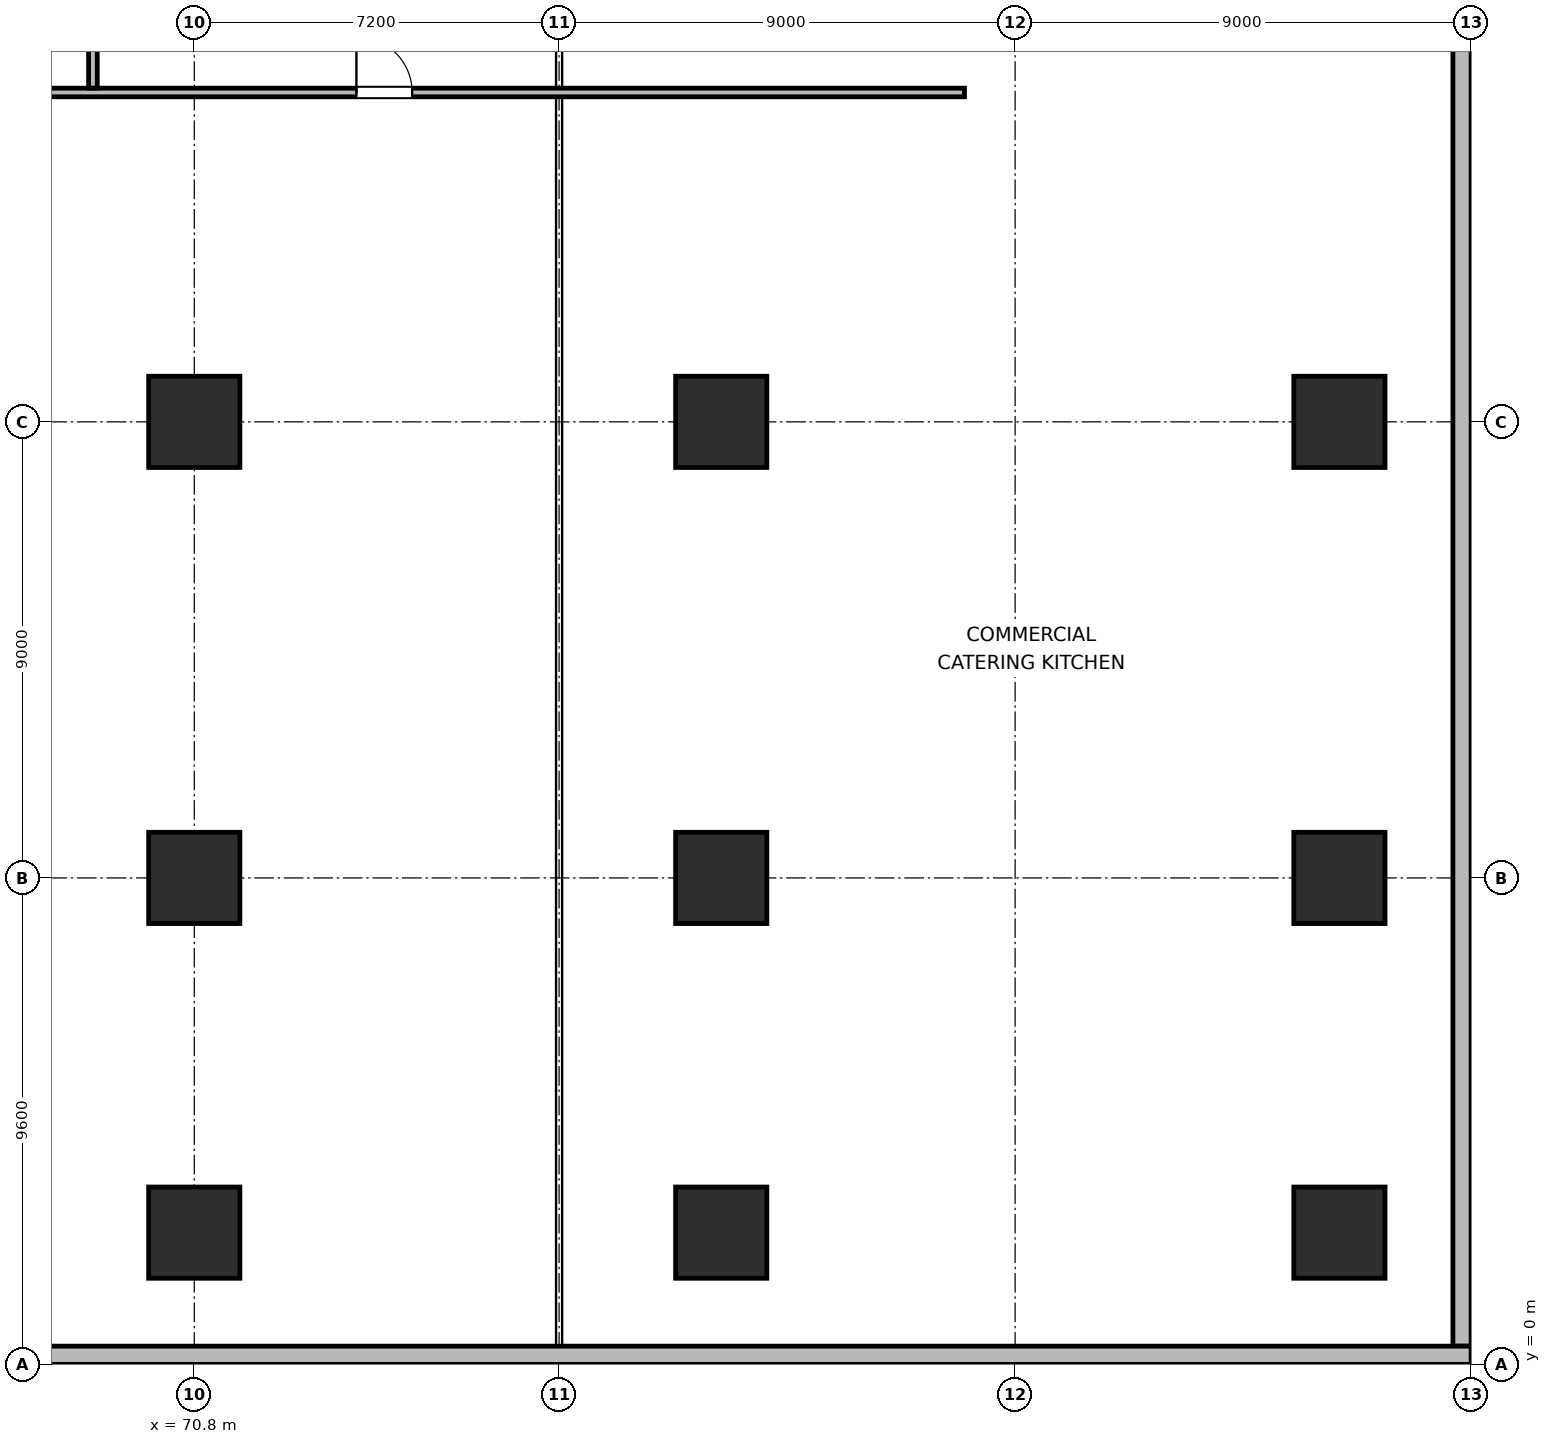
"""IFC4 building model, lengths in metres.
Left out: names, types, materials, properties, quantities, classifications, styles, units other than length and angle.
Written with IfcOpenShell. Run it as: python <this file> out.ifc"""

import sys

from ifc_helpers import new_model, si_unit, direction, frame, frame_2d, origin, origin_2d, place, context, subcontext, project, spatial, rectangle, extrude, element, fill, save


model = new_model("IFC4")
c1 = context("Model", 3, precision=1e-05, world=origin(), true_north=direction((0.0, 1.0)))
c2 = subcontext(c1, "Body", "Model", "MODEL_VIEW")
j1 = project(units=[si_unit("LENGTHUNIT", "METRE"), si_unit("PLANEANGLEUNIT", "RADIAN")], contexts=[c1])
p1 = place(None, origin())
s1 = spatial("IfcSite", under=j1, at=p1, CompositionType="ELEMENT")
p2 = place(p1, origin())
s2 = spatial("IfcBuilding", under=s1, at=p2, CompositionType="ELEMENT")
p3 = place(p2, frame((0.0, 0.0, 8.7)))
s3 = spatial("IfcBuildingStorey", under=s2, at=p3, CompositionType="ELEMENT", Elevation=8.7)
for number, where, z_axis, x_axis in (
    (1, (70.8, 2.6, 0.0), (0.0, 0.0, 1.0), (1.0, 0.0, 0.0)),
    (2, (70.8, 9.6, 0.0), (0.0, 0.0, 1.0), (1.0, 0.0, 0.0)),
    (3, (70.8, 18.6, 0.0), (0.0, 0.0, 1.0), (1.0, 0.0, 0.0)),
    (4, (81.2, 2.6, 0.0), (0.0, 0.0, 1.0), (1.0, 0.0, 0.0)),
    (5, (81.2, 9.6, 0.0), (0.0, 0.0, 1.0), (1.0, 0.0, 0.0)),
    (6, (81.2, 18.6, 0.0), (0.0, 0.0, 1.0), (1.0, 0.0, 0.0)),
    (7, (93.4, 2.6, 0.0), (0.0, 0.0, 1.0), (1.0, 0.0, 0.0)),
    (8, (93.4, 9.6, 0.0), (0.0, 0.0, 1.0), (1.0, 0.0, 0.0)),
    (9, (93.4, 18.6, 0.0), (0.0, 0.0, 1.0), (1.0, 0.0, 0.0)),
):
    element("IfcColumn", number, at=place(p3, frame(where, z_axis=z_axis, x_axis=x_axis)), inside=s3, PredefinedType="COLUMN", context=c2, shape_type="SweptSolid", body=[
        extrude(rectangle(XDim=1.8, YDim=1.8, at=origin_2d()), origin(), (0.0, 0.0, 1.0), 4.2),
    ])
p4 = place(p3, frame((95.82, 71.64, 0.0), z_axis=(0.0, 0.0, 1.0), x_axis=(0.0, -1.0, 0.0)))
e10 = element("IfcWall", 10, at=p4, inside=s3, PredefinedType="SOLIDWALL", context=c2, shape_type="SweptSolid", body=[
    extrude(rectangle(XDim=71.28, YDim=0.36, at=frame_2d((35.64, 0.0))), origin(), (0.0, 0.0, 1.0), 3.88),
])
p5 = place(p3, frame((96.0, 0.18, 0.0), z_axis=(0.0, 0.0, 1.0), x_axis=(-1.0, 0.0, 0.0)))
e11 = element("IfcWall", 11, at=p5, inside=s3, PredefinedType="SOLIDWALL", context=c2, shape_type="SweptSolid", body=[
    extrude(rectangle(XDim=39.72, YDim=0.36, at=frame_2d((19.86, 0.0))), origin(), (0.0, 0.0, 1.0), 3.88),
])
p6 = place(p3, frame((10.0, 25.1, 0.0), z_axis=(0.0, 0.0, 1.0), x_axis=(1.0, 0.0, 0.0)))
e12 = element("IfcWall", 12, at=p6, inside=s3, PredefinedType="PARTITIONING", context=c2, shape_type="SweptSolid", body=[
    extrude(rectangle(XDim=76.0, YDim=0.17, at=frame_2d((38.0, 0.0))), origin(), (0.0, 0.0, 1.0), 3.88),
])
p7 = place(p6, frame((2.2, 0.0, 0.0)))
e13 = element("IfcOpeningElement", 13, at=p7, cuts=e12, PredefinedType="OPENING", context=c2, shape_type="SweptSolid", body=[
    extrude(rectangle(XDim=1.8, YDim=2.06, at=frame_2d((0.9, 1.03))), frame((0.0, 0.095, 0.0), z_axis=(0.0, -1.0, 0.0), x_axis=(1.0, 0.0, 0.0)), (0.0, 0.0, 1.0), 0.19),
])
p8 = place(p6, frame((34.0, 0.0, 0.0)))
e14 = element("IfcOpeningElement", 14, at=p8, cuts=e12, PredefinedType="OPENING", context=c2, shape_type="SweptSolid", body=[
    extrude(rectangle(XDim=1.8, YDim=2.06, at=frame_2d((0.9, 1.03))), frame((0.0, 0.095, 0.0), z_axis=(0.0, -1.0, 0.0), x_axis=(1.0, 0.0, 0.0)), (0.0, 0.0, 1.0), 0.19),
])
p9 = place(p6, frame((64.0, 0.0, 0.0)))
e15 = element("IfcOpeningElement", 15, at=p9, cuts=e12, PredefinedType="OPENING", context=c2, shape_type="SweptSolid", body=[
    extrude(rectangle(XDim=1.1, YDim=2.05, at=frame_2d((0.55, 1.025))), frame((0.0, 0.095, 0.0), z_axis=(0.0, -1.0, 0.0), x_axis=(1.0, 0.0, 0.0)), (0.0, 0.0, 1.0), 0.19),
])
p10 = place(p3, frame((68.8, 25.187, 0.0), z_axis=(0.0, 0.0, 1.0), x_axis=(0.0, 1.0, 0.0)))
e16 = element("IfcWall", 16, at=p10, inside=s3, PredefinedType="PARTITIONING", context=c2, shape_type="SweptSolid", body=[
    extrude(rectangle(XDim=46.448, YDim=0.17, at=frame_2d((23.224, 0.0))), origin(), (0.0, 0.0, 1.0), 3.88),
])
p11 = place(p10, frame((15.913, 0.0, 0.0)))
e17 = element("IfcOpeningElement", 17, at=p11, cuts=e16, PredefinedType="OPENING", context=c2, shape_type="SweptSolid", body=[
    extrude(rectangle(XDim=1.1, YDim=2.05, at=frame_2d((0.55, 1.025))), frame((0.0, 0.095, 0.0), z_axis=(0.0, -1.0, 0.0), x_axis=(1.0, 0.0, 0.0)), (0.0, 0.0, 1.0), 0.19),
])
p12 = place(p9, origin())
e18 = element("IfcDoor", 18, at=p12, inside=s3, OperationType="SINGLE_SWING_LEFT", PredefinedType="DOOR", context=c2, shape_type="SweptSolid", body=[
    extrude(rectangle(XDim=1.1, YDim=2.05, at=frame_2d((0.55, 1.025))), frame((0.0, 0.025, 0.0), z_axis=(0.0, -1.0, 0.0), x_axis=(1.0, 0.0, 0.0)), (0.0, 0.0, 1.0), 0.05),
])
fill(e15, e18)
save(model, sys.argv[1])
